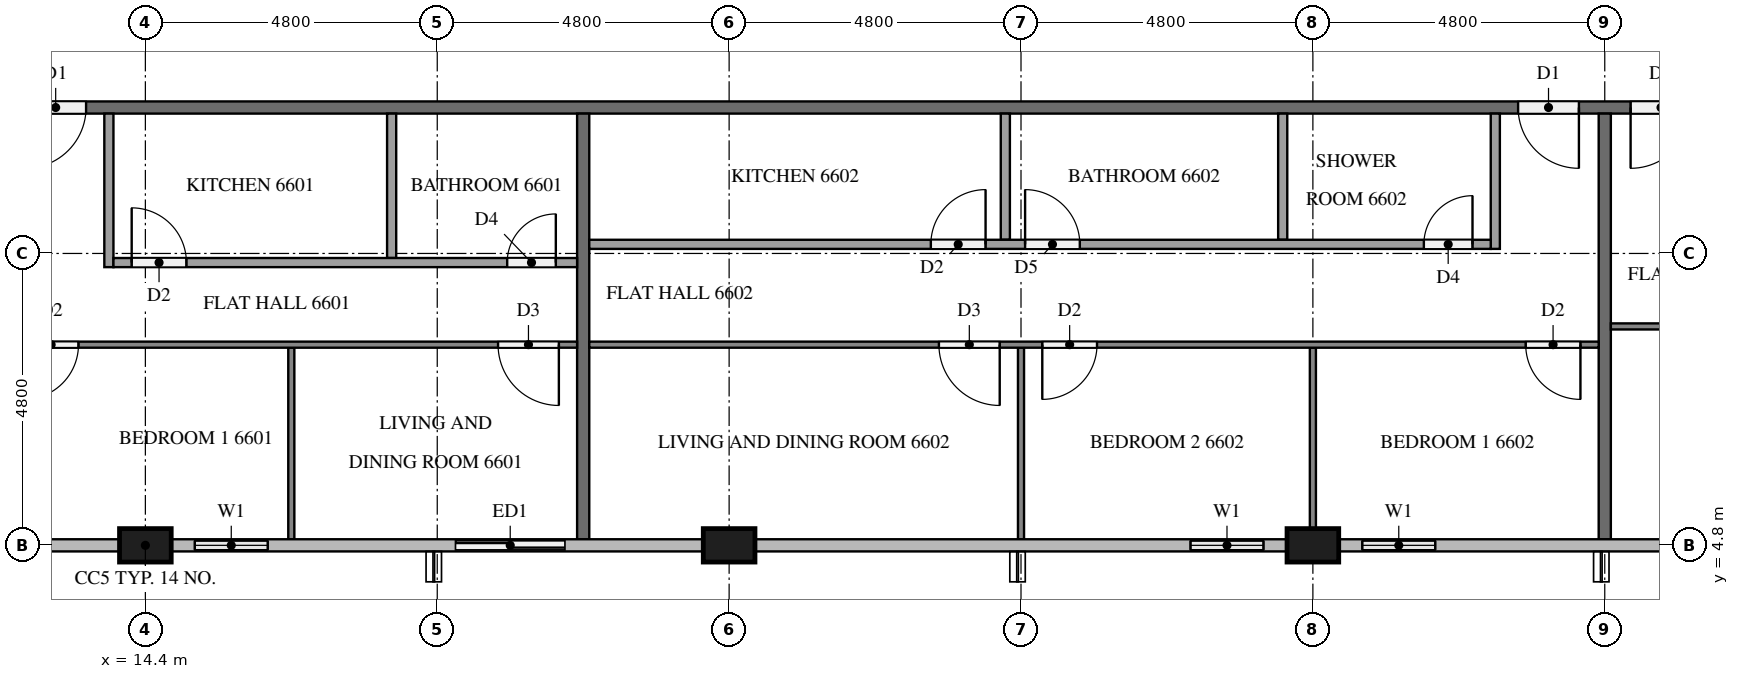
"""IFC4 building model, lengths in metres.
Left out: names, types, materials, properties, quantities, classifications, styles, units other than length and angle.
Written with IfcOpenShell. Run it as: python <this file> out.ifc"""

import sys

from ifc_helpers import new_model, si_unit, direction, frame, frame_2d, origin, origin_2d, place, context, subcontext, project, spatial, rectangle, extrude, element, fill, save


model = new_model("IFC4")
c1 = context("Model", 3, precision=1e-05, world=origin(), true_north=direction((0.0, 1.0)))
c2 = subcontext(c1, "Body", "Model", "MODEL_VIEW")
j1 = project(units=[si_unit("LENGTHUNIT", "METRE"), si_unit("PLANEANGLEUNIT", "RADIAN")], contexts=[c1])
p1 = place(None, origin())
s1 = spatial("IfcSite", under=j1, at=p1, CompositionType="ELEMENT")
p2 = place(p1, origin())
s2 = spatial("IfcBuilding", under=s1, at=p2, CompositionType="ELEMENT")
p3 = place(p2, frame((0.0, 0.0, 252.7)))
s3 = spatial("IfcBuildingStorey", under=s2, at=p3, CompositionType="ELEMENT", Elevation=252.7)
for number, where, z_axis, x_axis in (
    (1, (14.4, 4.8, 0.0), (0.0, 0.0, 1.0), (1.0, 0.0, 0.0)),
    (2, (24.0, 4.8, 0.0), (0.0, 0.0, 1.0), (1.0, 0.0, 0.0)),
    (3, (33.6, 4.8, 0.0), (0.0, 0.0, 1.0), (1.0, 0.0, 0.0)),
):
    element("IfcColumn", number, at=place(p3, frame(where, z_axis=z_axis, x_axis=x_axis)), inside=s3, PredefinedType="COLUMN", context=c2, shape_type="SweptSolid", body=[
        extrude(rectangle(XDim=0.85, YDim=0.55, at=origin_2d()), origin(), (0.0, 0.0, 1.0), 3.2),
    ])
p4 = place(p3, frame((14.825, 4.8, 0.0), z_axis=(0.0, 0.0, 1.0), x_axis=(1.0, 0.0, 0.0)))
e4 = element("IfcWall", 4, at=p4, inside=s3, PredefinedType="SOLIDWALL", context=c2, shape_type="SweptSolid", body=[
    extrude(rectangle(XDim=1.975, YDim=0.15, at=frame_2d((0.988, 0.0))), origin(), (0.0, 0.0, 1.0), 3.2),
])
p5 = place(p4, frame((0.387, 0.0, 0.9)))
e5 = element("IfcOpeningElement", 5, at=p5, cuts=e4, PredefinedType="OPENING", context=c2, shape_type="SweptSolid", body=[
    extrude(rectangle(XDim=1.2, YDim=1.4, at=frame_2d((0.6, 0.7))), frame((0.0, 0.085, 0.0), z_axis=(0.0, -1.0, 0.0), x_axis=(1.0, 0.0, 0.0)), (0.0, 0.0, 1.0), 0.17),
])
p6 = place(p3, frame((19.2, 4.8, 0.0), z_axis=(0.0, 0.0, 1.0), x_axis=(1.0, 0.0, 0.0)))
e6 = element("IfcWall", 6, at=p6, inside=s3, PredefinedType="SOLIDWALL", context=c2, shape_type="SweptSolid", body=[
    extrude(rectangle(XDim=2.4, YDim=0.15, at=frame_2d((1.2, 0.0))), origin(), (0.0, 0.0, 1.0), 3.2),
])
p7 = place(p6, frame((0.3, 0.0, 0.0)))
e7 = element("IfcOpeningElement", 7, at=p7, cuts=e6, PredefinedType="OPENING", context=c2, shape_type="SweptSolid", body=[
    extrude(rectangle(XDim=1.8, YDim=2.4, at=frame_2d((0.9, 1.2))), frame((0.0, 0.085, 0.0), z_axis=(0.0, -1.0, 0.0), x_axis=(1.0, 0.0, 0.0)), (0.0, 0.0, 1.0), 0.17),
])
p8 = place(p3, frame((31.2, 4.8, 0.0), z_axis=(0.0, 0.0, 1.0), x_axis=(1.0, 0.0, 0.0)))
e8 = element("IfcWall", 8, at=p8, inside=s3, PredefinedType="SOLIDWALL", context=c2, shape_type="SweptSolid", body=[
    extrude(rectangle(XDim=1.975, YDim=0.15, at=frame_2d((0.988, 0.0))), origin(), (0.0, 0.0, 1.0), 3.2),
])
p9 = place(p8, frame((0.387, 0.0, 0.9)))
e9 = element("IfcOpeningElement", 9, at=p9, cuts=e8, PredefinedType="OPENING", context=c2, shape_type="SweptSolid", body=[
    extrude(rectangle(XDim=1.2, YDim=1.4, at=frame_2d((0.6, 0.7))), frame((0.0, 0.085, 0.0), z_axis=(0.0, -1.0, 0.0), x_axis=(1.0, 0.0, 0.0)), (0.0, 0.0, 1.0), 0.17),
])
p10 = place(p3, frame((34.025, 4.8, 0.0), z_axis=(0.0, 0.0, 1.0), x_axis=(1.0, 0.0, 0.0)))
e10 = element("IfcWall", 10, at=p10, inside=s3, PredefinedType="SOLIDWALL", context=c2, shape_type="SweptSolid", body=[
    extrude(rectangle(XDim=1.975, YDim=0.15, at=frame_2d((0.988, 0.0))), origin(), (0.0, 0.0, 1.0), 3.2),
])
p11 = place(p10, frame((0.387, 0.0, 0.9)))
e11 = element("IfcOpeningElement", 11, at=p11, cuts=e10, PredefinedType="OPENING", context=c2, shape_type="SweptSolid", body=[
    extrude(rectangle(XDim=1.2, YDim=1.4, at=frame_2d((0.6, 0.7))), frame((0.0, 0.085, 0.0), z_axis=(0.0, -1.0, 0.0), x_axis=(1.0, 0.0, 0.0)), (0.0, 0.0, 1.0), 0.17),
])
p12 = place(p3, frame((50.5, 12.0, 0.0), z_axis=(0.0, 0.0, 1.0), x_axis=(-1.0, 0.0, 0.0)))
e12 = element("IfcWall", 12, at=p12, inside=s3, PredefinedType="PARTITIONING", context=c2, shape_type="SweptSolid", body=[
    extrude(rectangle(XDim=38.6, YDim=0.2, at=frame_2d((19.3, 0.0))), origin(), (0.0, 0.0, 1.0), 3.2),
])
p13 = place(p12, frame((37.075, 0.0, 0.0)))
e13 = element("IfcOpeningElement", 13, at=p13, cuts=e12, PredefinedType="OPENING", context=c2, shape_type="SweptSolid", body=[
    extrude(rectangle(XDim=1.0, YDim=2.1, at=frame_2d((0.5, 1.05))), frame((0.0, 0.11, 0.0), z_axis=(0.0, -1.0, 0.0), x_axis=(1.0, 0.0, 0.0)), (0.0, 0.0, 1.0), 0.22),
])
p14 = place(p12, frame((12.525, 0.0, 0.0)))
e14 = element("IfcOpeningElement", 14, at=p14, cuts=e12, PredefinedType="OPENING", context=c2, shape_type="SweptSolid", body=[
    extrude(rectangle(XDim=1.0, YDim=2.1, at=frame_2d((0.5, 1.05))), frame((0.0, 0.11, 0.0), z_axis=(0.0, -1.0, 0.0), x_axis=(1.0, 0.0, 0.0)), (0.0, 0.0, 1.0), 0.22),
])
p15 = place(p12, frame((10.675, 0.0, 0.0)))
e15 = element("IfcOpeningElement", 15, at=p15, cuts=e12, PredefinedType="OPENING", context=c2, shape_type="SweptSolid", body=[
    extrude(rectangle(XDim=1.0, YDim=2.1, at=frame_2d((0.5, 1.05))), frame((0.0, 0.11, 0.0), z_axis=(0.0, -1.0, 0.0), x_axis=(1.0, 0.0, 0.0)), (0.0, 0.0, 1.0), 0.22),
])
for number, where, z_axis, x_axis in (
    (16, (21.6, 11.9, 0.0), (0.0, 0.0, 1.0), (0.0, -1.0, 0.0)),
    (17, (38.4, 11.9, 0.0), (0.0, 0.0, 1.0), (0.0, -1.0, 0.0)),
):
    element("IfcWall", number, at=place(p3, frame(where, z_axis=z_axis, x_axis=x_axis)), inside=s3, PredefinedType="PARTITIONING", context=c2, shape_type="SweptSolid", body=[
        extrude(rectangle(XDim=7.0, YDim=0.2, at=frame_2d((3.5, 0.0))), origin(), (0.0, 0.0, 1.0), 3.2),
    ])
p16 = place(p3, frame((16.8, 8.05, 0.0), z_axis=(0.0, 0.0, 1.0), x_axis=(0.0, -1.0, 0.0)))
e18 = element("IfcWall", 18, at=p16, inside=s3, PredefinedType="PARTITIONING", context=c2, shape_type="SweptSolid", body=[
    extrude(rectangle(XDim=3.15, YDim=0.1, at=frame_2d((1.575, 0.0))), origin(), (0.0, 0.0, 1.0), 3.2),
])
p17 = place(p3, frame((21.5, 8.1, 0.0), z_axis=(0.0, 0.0, 1.0), x_axis=(-1.0, 0.0, 0.0)))
e19 = element("IfcWall", 19, at=p17, inside=s3, PredefinedType="PARTITIONING", context=c2, shape_type="SweptSolid", body=[
    extrude(rectangle(XDim=9.4, YDim=0.1, at=frame_2d((4.7, 0.0))), origin(), (0.0, 0.0, 1.0), 3.2),
])
p18 = place(p17, frame((8.2, 0.0, 0.0)))
e20 = element("IfcOpeningElement", 20, at=p18, cuts=e19, PredefinedType="OPENING", context=c2, shape_type="SweptSolid", body=[
    extrude(rectangle(XDim=0.9, YDim=2.1, at=frame_2d((0.45, 1.05))), frame((0.0, 0.06, 0.0), z_axis=(0.0, -1.0, 0.0), x_axis=(1.0, 0.0, 0.0)), (0.0, 0.0, 1.0), 0.12),
])
p19 = place(p17, frame((0.3, 0.0, 0.0)))
e21 = element("IfcOpeningElement", 21, at=p19, cuts=e19, PredefinedType="OPENING", context=c2, shape_type="SweptSolid", body=[
    extrude(rectangle(XDim=1.0, YDim=2.1, at=frame_2d((0.5, 1.05))), frame((0.0, 0.06, 0.0), z_axis=(0.0, -1.0, 0.0), x_axis=(1.0, 0.0, 0.0)), (0.0, 0.0, 1.0), 0.12),
])
p20 = place(p3, frame((18.45, 11.9, 0.0), z_axis=(0.0, 0.0, 1.0), x_axis=(0.0, -1.0, 0.0)))
e22 = element("IfcWall", 22, at=p20, inside=s3, PredefinedType="PARTITIONING", context=c2, shape_type="SweptSolid", body=[
    extrude(rectangle(XDim=2.375, YDim=0.15, at=frame_2d((1.188, 0.0))), origin(), (0.0, 0.0, 1.0), 3.2),
])
p21 = place(p3, frame((13.8, 11.9, 0.0), z_axis=(0.0, 0.0, 1.0), x_axis=(0.0, -1.0, 0.0)))
e23 = element("IfcWall", 23, at=p21, inside=s3, PredefinedType="PARTITIONING", context=c2, shape_type="SweptSolid", body=[
    extrude(rectangle(XDim=2.525, YDim=0.15, at=frame_2d((1.262, 0.0))), origin(), (0.0, 0.0, 1.0), 3.2),
])
p22 = place(p3, frame((13.875, 9.45, 0.0), z_axis=(0.0, 0.0, 1.0), x_axis=(1.0, 0.0, 0.0)))
e24 = element("IfcWall", 24, at=p22, inside=s3, PredefinedType="PARTITIONING", context=c2, shape_type="SweptSolid", body=[
    extrude(rectangle(XDim=7.625, YDim=0.15, at=frame_2d((3.812, 0.0))), origin(), (0.0, 0.0, 1.0), 3.2),
])
p23 = place(p22, frame((0.3, 0.0, 0.0)))
e25 = element("IfcOpeningElement", 25, at=p23, cuts=e24, PredefinedType="OPENING", context=c2, shape_type="SweptSolid", body=[
    extrude(rectangle(XDim=0.9, YDim=2.1, at=frame_2d((0.45, 1.05))), frame((0.0, 0.085, 0.0), z_axis=(0.0, -1.0, 0.0), x_axis=(1.0, 0.0, 0.0)), (0.0, 0.0, 1.0), 0.17),
])
p24 = place(p22, frame((6.475, 0.0, 0.0)))
e26 = element("IfcOpeningElement", 26, at=p24, cuts=e24, PredefinedType="OPENING", context=c2, shape_type="SweptSolid", body=[
    extrude(rectangle(XDim=0.8, YDim=2.1, at=frame_2d((0.4, 1.05))), frame((0.0, 0.085, 0.0), z_axis=(0.0, -1.0, 0.0), x_axis=(1.0, 0.0, 0.0)), (0.0, 0.0, 1.0), 0.17),
])
p25 = place(p3, frame((33.6, 8.05, 0.0), z_axis=(0.0, 0.0, 1.0), x_axis=(0.0, -1.0, 0.0)))
e27 = element("IfcWall", 27, at=p25, inside=s3, PredefinedType="PARTITIONING", context=c2, shape_type="SweptSolid", body=[
    extrude(rectangle(XDim=2.975, YDim=0.1, at=frame_2d((1.488, 0.0))), origin(), (0.0, 0.0, 1.0), 3.2),
])
p26 = place(p3, frame((28.8, 8.05, 0.0), z_axis=(0.0, 0.0, 1.0), x_axis=(0.0, -1.0, 0.0)))
e28 = element("IfcWall", 28, at=p26, inside=s3, PredefinedType="PARTITIONING", context=c2, shape_type="SweptSolid", body=[
    extrude(rectangle(XDim=3.15, YDim=0.1, at=frame_2d((1.575, 0.0))), origin(), (0.0, 0.0, 1.0), 3.2),
])
p27 = place(p3, frame((38.3, 8.1, 0.0), z_axis=(0.0, 0.0, 1.0), x_axis=(-1.0, 0.0, 0.0)))
e29 = element("IfcWall", 29, at=p27, inside=s3, PredefinedType="PARTITIONING", context=c2, shape_type="SweptSolid", body=[
    extrude(rectangle(XDim=16.6, YDim=0.1, at=frame_2d((8.3, 0.0))), origin(), (0.0, 0.0, 1.0), 3.2),
])
p28 = place(p27, frame((0.3, 0.0, 0.0)))
e30 = element("IfcOpeningElement", 30, at=p28, cuts=e29, PredefinedType="OPENING", context=c2, shape_type="SweptSolid", body=[
    extrude(rectangle(XDim=0.9, YDim=2.1, at=frame_2d((0.45, 1.05))), frame((0.0, 0.06, 0.0), z_axis=(0.0, -1.0, 0.0), x_axis=(1.0, 0.0, 0.0)), (0.0, 0.0, 1.0), 0.12),
])
p29 = place(p27, frame((8.25, 0.0, 0.0)))
e31 = element("IfcOpeningElement", 31, at=p29, cuts=e29, PredefinedType="OPENING", context=c2, shape_type="SweptSolid", body=[
    extrude(rectangle(XDim=0.9, YDim=2.1, at=frame_2d((0.45, 1.05))), frame((0.0, 0.06, 0.0), z_axis=(0.0, -1.0, 0.0), x_axis=(1.0, 0.0, 0.0)), (0.0, 0.0, 1.0), 0.12),
])
p30 = place(p27, frame((9.85, 0.0, 0.0)))
e32 = element("IfcOpeningElement", 32, at=p30, cuts=e29, PredefinedType="OPENING", context=c2, shape_type="SweptSolid", body=[
    extrude(rectangle(XDim=1.0, YDim=2.1, at=frame_2d((0.5, 1.05))), frame((0.0, 0.06, 0.0), z_axis=(0.0, -1.0, 0.0), x_axis=(1.0, 0.0, 0.0)), (0.0, 0.0, 1.0), 0.12),
])
for number, where, z_axis, x_axis in (
    (33, (33.104, 11.9, 0.0), (0.0, 0.0, 1.0), (0.0, -1.0, 0.0)),
    (34, (28.542, 11.9, 0.0), (0.0, 0.0, 1.0), (0.0, -1.0, 0.0)),
):
    element("IfcWall", number, at=place(p3, frame(where, z_axis=z_axis, x_axis=x_axis)), inside=s3, PredefinedType="PARTITIONING", context=c2, shape_type="SweptSolid", body=[
        extrude(rectangle(XDim=2.075, YDim=0.15, at=frame_2d((1.038, 0.0))), origin(), (0.0, 0.0, 1.0), 3.2),
    ])
p31 = place(p3, frame((36.6, 11.9, 0.0), z_axis=(0.0, 0.0, 1.0), x_axis=(0.0, -1.0, 0.0)))
e35 = element("IfcWall", 35, at=p31, inside=s3, PredefinedType="PARTITIONING", context=c2, shape_type="SweptSolid", body=[
    extrude(rectangle(XDim=2.225, YDim=0.15, at=frame_2d((1.112, 0.0))), origin(), (0.0, 0.0, 1.0), 3.2),
])
p32 = place(p3, frame((21.7, 9.75, 0.0), z_axis=(0.0, 0.0, 1.0), x_axis=(1.0, 0.0, 0.0)))
e36 = element("IfcWall", 36, at=p32, inside=s3, PredefinedType="PARTITIONING", context=c2, shape_type="SweptSolid", body=[
    extrude(rectangle(XDim=14.825, YDim=0.15, at=frame_2d((7.413, 0.0))), origin(), (0.0, 0.0, 1.0), 3.2),
])
p33 = place(p32, frame((13.725, 0.0, 0.0)))
e37 = element("IfcOpeningElement", 37, at=p33, cuts=e36, PredefinedType="OPENING", context=c2, shape_type="SweptSolid", body=[
    extrude(rectangle(XDim=0.8, YDim=2.1, at=frame_2d((0.4, 1.05))), frame((0.0, 0.085, 0.0), z_axis=(0.0, -1.0, 0.0), x_axis=(1.0, 0.0, 0.0)), (0.0, 0.0, 1.0), 0.17),
])
p34 = place(p32, frame((7.167, 0.0, 0.0)))
e38 = element("IfcOpeningElement", 38, at=p34, cuts=e36, PredefinedType="OPENING", context=c2, shape_type="SweptSolid", body=[
    extrude(rectangle(XDim=0.9, YDim=2.1, at=frame_2d((0.45, 1.05))), frame((0.0, 0.085, 0.0), z_axis=(0.0, -1.0, 0.0), x_axis=(1.0, 0.0, 0.0)), (0.0, 0.0, 1.0), 0.17),
])
p35 = place(p32, frame((5.617, 0.0, 0.0)))
e39 = element("IfcOpeningElement", 39, at=p35, cuts=e36, PredefinedType="OPENING", context=c2, shape_type="SweptSolid", body=[
    extrude(rectangle(XDim=0.9, YDim=2.1, at=frame_2d((0.45, 1.05))), frame((0.0, 0.085, 0.0), z_axis=(0.0, -1.0, 0.0), x_axis=(1.0, 0.0, 0.0)), (0.0, 0.0, 1.0), 0.17),
])
p36 = place(p3, frame((50.3, 8.4, 0.0), z_axis=(0.0, 0.0, 1.0), x_axis=(-1.0, 0.0, 0.0)))
e40 = element("IfcWall", 40, at=p36, inside=s3, PredefinedType="PARTITIONING", context=c2, shape_type="SweptSolid", body=[
    extrude(rectangle(XDim=11.8, YDim=0.1, at=frame_2d((5.9, 0.0))), origin(), (0.0, 0.0, 1.0), 3.2),
])
p37 = place(p36, frame((7.45, 0.0, 0.0)))
e41 = element("IfcOpeningElement", 41, at=p37, cuts=e40, PredefinedType="OPENING", context=c2, shape_type="SweptSolid", body=[
    extrude(rectangle(XDim=0.9, YDim=2.1, at=frame_2d((0.45, 1.05))), frame((0.0, 0.06, 0.0), z_axis=(0.0, -1.0, 0.0), x_axis=(1.0, 0.0, 0.0)), (0.0, 0.0, 1.0), 0.12),
])
p38 = place(p36, frame((5.75, 0.0, 0.0)))
e42 = element("IfcOpeningElement", 42, at=p38, cuts=e40, PredefinedType="OPENING", context=c2, shape_type="SweptSolid", body=[
    extrude(rectangle(XDim=1.0, YDim=2.1, at=frame_2d((0.5, 1.05))), frame((0.0, 0.06, 0.0), z_axis=(0.0, -1.0, 0.0), x_axis=(1.0, 0.0, 0.0)), (0.0, 0.0, 1.0), 0.12),
])
p39 = place(p5, origin())
e43 = element("IfcWindow", 43, at=p39, inside=s3, PartitioningType="SINGLE_PANEL", PredefinedType="WINDOW", context=c2, shape_type="SweptSolid", body=[
    extrude(rectangle(XDim=1.2, YDim=1.4, at=frame_2d((0.6, 0.7))), frame((0.0, 0.03, 0.0), z_axis=(0.0, -1.0, 0.0), x_axis=(1.0, 0.0, 0.0)), (0.0, 0.0, 1.0), 0.06),
])
fill(e5, e43)
p40 = place(p7, origin())
e44 = element("IfcDoor", 44, at=p40, inside=s3, OperationType="SLIDING_TO_LEFT", PredefinedType="DOOR", context=c2, shape_type="SweptSolid", body=[
    extrude(rectangle(XDim=1.8, YDim=2.4, at=frame_2d((0.9, 1.2))), frame((0.0, 0.025, 0.0), z_axis=(0.0, -1.0, 0.0), x_axis=(1.0, 0.0, 0.0)), (0.0, 0.0, 1.0), 0.05),
])
fill(e7, e44)
p41 = place(p9, origin())
e45 = element("IfcWindow", 45, at=p41, inside=s3, PartitioningType="SINGLE_PANEL", PredefinedType="WINDOW", context=c2, shape_type="SweptSolid", body=[
    extrude(rectangle(XDim=1.2, YDim=1.4, at=frame_2d((0.6, 0.7))), frame((0.0, 0.03, 0.0), z_axis=(0.0, -1.0, 0.0), x_axis=(1.0, 0.0, 0.0)), (0.0, 0.0, 1.0), 0.06),
])
fill(e9, e45)
p42 = place(p11, origin())
e46 = element("IfcWindow", 46, at=p42, inside=s3, PartitioningType="SINGLE_PANEL", PredefinedType="WINDOW", context=c2, shape_type="SweptSolid", body=[
    extrude(rectangle(XDim=1.2, YDim=1.4, at=frame_2d((0.6, 0.7))), frame((0.0, 0.03, 0.0), z_axis=(0.0, -1.0, 0.0), x_axis=(1.0, 0.0, 0.0)), (0.0, 0.0, 1.0), 0.06),
])
fill(e11, e46)
p43 = place(p13, origin())
e47 = element("IfcDoor", 47, at=p43, inside=s3, OperationType="SINGLE_SWING_RIGHT", PredefinedType="DOOR", context=c2, shape_type="SweptSolid", body=[
    extrude(rectangle(XDim=1.0, YDim=2.1, at=frame_2d((0.5, 1.05))), frame((0.0, 0.025, 0.0), z_axis=(0.0, -1.0, 0.0), x_axis=(1.0, 0.0, 0.0)), (0.0, 0.0, 1.0), 0.05),
])
fill(e13, e47)
p44 = place(p14, origin())
e48 = element("IfcDoor", 48, at=p44, inside=s3, OperationType="SINGLE_SWING_LEFT", PredefinedType="DOOR", context=c2, shape_type="SweptSolid", body=[
    extrude(rectangle(XDim=1.0, YDim=2.1, at=frame_2d((0.5, 1.05))), frame((0.0, 0.025, 0.0), z_axis=(0.0, -1.0, 0.0), x_axis=(1.0, 0.0, 0.0)), (0.0, 0.0, 1.0), 0.05),
])
fill(e14, e48)
p45 = place(p15, origin())
e49 = element("IfcDoor", 49, at=p45, inside=s3, OperationType="SINGLE_SWING_RIGHT", PredefinedType="DOOR", context=c2, shape_type="SweptSolid", body=[
    extrude(rectangle(XDim=1.0, YDim=2.1, at=frame_2d((0.5, 1.05))), frame((0.0, 0.025, 0.0), z_axis=(0.0, -1.0, 0.0), x_axis=(1.0, 0.0, 0.0)), (0.0, 0.0, 1.0), 0.05),
])
fill(e15, e49)
p46 = place(p18, origin())
e50 = element("IfcDoor", 50, at=p46, inside=s3, OperationType="SINGLE_SWING_RIGHT", PredefinedType="DOOR", context=c2, shape_type="SweptSolid", body=[
    extrude(rectangle(XDim=0.9, YDim=2.1, at=frame_2d((0.45, 1.05))), frame((0.0, 0.025, 0.0), z_axis=(0.0, -1.0, 0.0), x_axis=(1.0, 0.0, 0.0)), (0.0, 0.0, 1.0), 0.05),
])
fill(e20, e50)
p47 = place(p19, origin())
e51 = element("IfcDoor", 51, at=p47, inside=s3, OperationType="SINGLE_SWING_LEFT", PredefinedType="DOOR", context=c2, shape_type="SweptSolid", body=[
    extrude(rectangle(XDim=1.0, YDim=2.1, at=frame_2d((0.5, 1.05))), frame((0.0, 0.025, 0.0), z_axis=(0.0, -1.0, 0.0), x_axis=(1.0, 0.0, 0.0)), (0.0, 0.0, 1.0), 0.05),
])
fill(e21, e51)
p48 = place(p23, origin())
e52 = element("IfcDoor", 52, at=p48, inside=s3, OperationType="SINGLE_SWING_LEFT", PredefinedType="DOOR", context=c2, shape_type="SweptSolid", body=[
    extrude(rectangle(XDim=0.9, YDim=2.1, at=frame_2d((0.45, 1.05))), frame((0.0, 0.025, 0.0), z_axis=(0.0, -1.0, 0.0), x_axis=(1.0, 0.0, 0.0)), (0.0, 0.0, 1.0), 0.05),
])
fill(e25, e52)
p49 = place(p24, origin())
e53 = element("IfcDoor", 53, at=p49, inside=s3, OperationType="SINGLE_SWING_RIGHT", PredefinedType="DOOR", context=c2, shape_type="SweptSolid", body=[
    extrude(rectangle(XDim=0.8, YDim=2.1, at=frame_2d((0.4, 1.05))), frame((0.0, 0.025, 0.0), z_axis=(0.0, -1.0, 0.0), x_axis=(1.0, 0.0, 0.0)), (0.0, 0.0, 1.0), 0.05),
])
fill(e26, e53)
p50 = place(p28, origin())
e54 = element("IfcDoor", 54, at=p50, inside=s3, OperationType="SINGLE_SWING_LEFT", PredefinedType="DOOR", context=c2, shape_type="SweptSolid", body=[
    extrude(rectangle(XDim=0.9, YDim=2.1, at=frame_2d((0.45, 1.05))), frame((0.0, 0.025, 0.0), z_axis=(0.0, -1.0, 0.0), x_axis=(1.0, 0.0, 0.0)), (0.0, 0.0, 1.0), 0.05),
])
fill(e30, e54)
p51 = place(p29, origin())
e55 = element("IfcDoor", 55, at=p51, inside=s3, OperationType="SINGLE_SWING_RIGHT", PredefinedType="DOOR", context=c2, shape_type="SweptSolid", body=[
    extrude(rectangle(XDim=0.9, YDim=2.1, at=frame_2d((0.45, 1.05))), frame((0.0, 0.025, 0.0), z_axis=(0.0, -1.0, 0.0), x_axis=(1.0, 0.0, 0.0)), (0.0, 0.0, 1.0), 0.05),
])
fill(e31, e55)
p52 = place(p30, origin())
e56 = element("IfcDoor", 56, at=p52, inside=s3, OperationType="SINGLE_SWING_LEFT", PredefinedType="DOOR", context=c2, shape_type="SweptSolid", body=[
    extrude(rectangle(XDim=1.0, YDim=2.1, at=frame_2d((0.5, 1.05))), frame((0.0, 0.025, 0.0), z_axis=(0.0, -1.0, 0.0), x_axis=(1.0, 0.0, 0.0)), (0.0, 0.0, 1.0), 0.05),
])
fill(e32, e56)
p53 = place(p33, origin())
e57 = element("IfcDoor", 57, at=p53, inside=s3, OperationType="SINGLE_SWING_RIGHT", PredefinedType="DOOR", context=c2, shape_type="SweptSolid", body=[
    extrude(rectangle(XDim=0.8, YDim=2.1, at=frame_2d((0.4, 1.05))), frame((0.0, 0.025, 0.0), z_axis=(0.0, -1.0, 0.0), x_axis=(1.0, 0.0, 0.0)), (0.0, 0.0, 1.0), 0.05),
])
fill(e37, e57)
p54 = place(p34, origin())
e58 = element("IfcDoor", 58, at=p54, inside=s3, OperationType="SINGLE_SWING_LEFT", PredefinedType="DOOR", context=c2, shape_type="SweptSolid", body=[
    extrude(rectangle(XDim=0.9, YDim=2.1, at=frame_2d((0.45, 1.05))), frame((0.0, 0.025, 0.0), z_axis=(0.0, -1.0, 0.0), x_axis=(1.0, 0.0, 0.0)), (0.0, 0.0, 1.0), 0.05),
])
fill(e38, e58)
p55 = place(p35, origin())
e59 = element("IfcDoor", 59, at=p55, inside=s3, OperationType="SINGLE_SWING_RIGHT", PredefinedType="DOOR", context=c2, shape_type="SweptSolid", body=[
    extrude(rectangle(XDim=0.9, YDim=2.1, at=frame_2d((0.45, 1.05))), frame((0.0, 0.025, 0.0), z_axis=(0.0, -1.0, 0.0), x_axis=(1.0, 0.0, 0.0)), (0.0, 0.0, 1.0), 0.05),
])
fill(e39, e59)
save(model, sys.argv[1])
